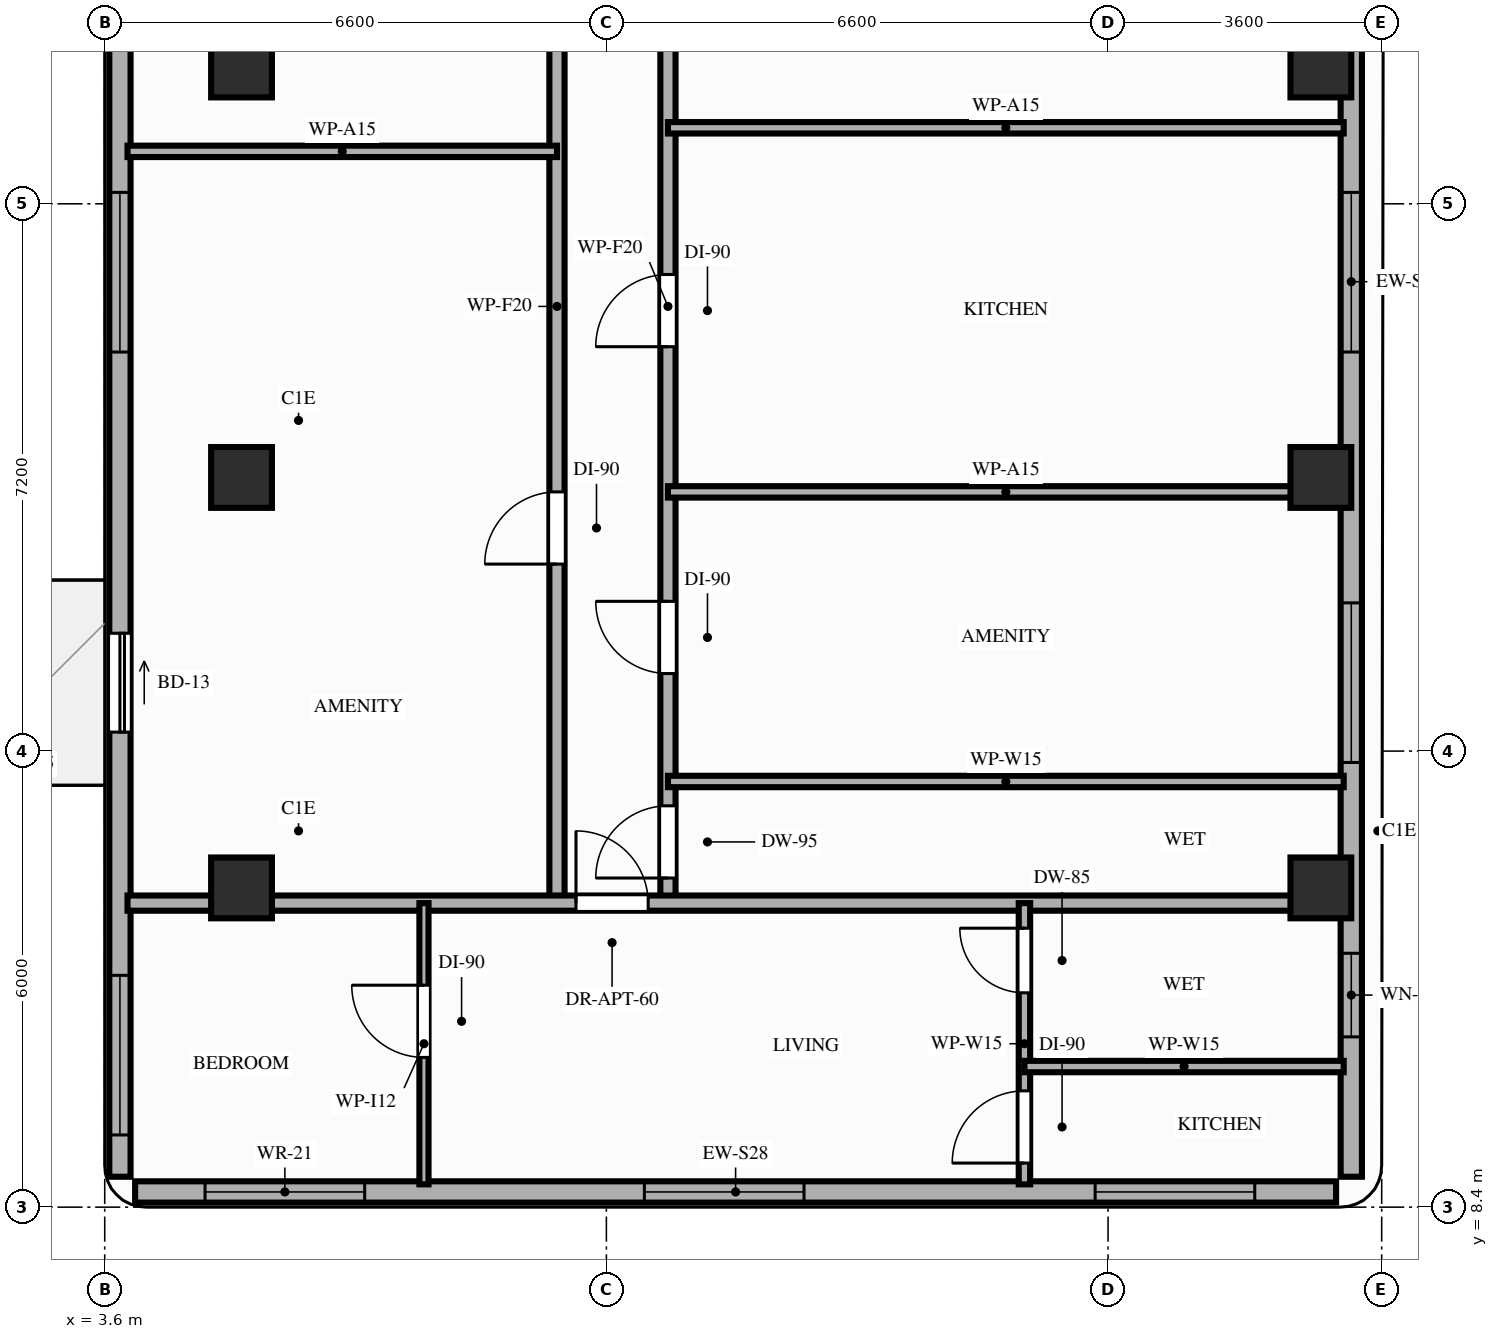
"""IFC4 building model, lengths in metres.
Left out: names, types, materials, properties, quantities, classifications, styles, units other than length and angle.
Written with IfcOpenShell. Run it as: python <this file> out.ifc"""

import sys

from ifc_helpers import new_model, si_unit, direction, frame, frame_2d, origin, origin_2d, place, context, subcontext, project, spatial, rectangle, extrude, element, fill, save


model = new_model("IFC4")
c1 = context("Model", 3, precision=1e-05, world=origin(), true_north=direction((0.0, 1.0)))
c2 = subcontext(c1, "Body", "Model", "MODEL_VIEW")
j1 = project(units=[si_unit("LENGTHUNIT", "METRE"), si_unit("PLANEANGLEUNIT", "RADIAN")], contexts=[c1])
p1 = place(None, origin())
s1 = spatial("IfcSite", under=j1, at=p1, CompositionType="ELEMENT")
p2 = place(p1, origin())
s2 = spatial("IfcBuilding", under=s1, at=p2, CompositionType="ELEMENT")
p3 = place(p2, frame((0.0, 0.0, 221.6)))
s3 = spatial("IfcBuildingStorey", under=s2, at=p3, CompositionType="ELEMENT", Elevation=221.6)
for number, where, z_axis, x_axis in (
    (1, (5.4, 12.6, 0.0), (0.0, 0.0, 1.0), (1.0, 0.0, 0.0)),
    (2, (19.6, 12.6, 0.0), (0.0, 0.0, 1.0), (1.0, 0.0, 0.0)),
    (3, (5.4, 18.0, 0.0), (0.0, 0.0, 1.0), (1.0, 0.0, 0.0)),
    (4, (19.6, 18.0, 0.0), (0.0, 0.0, 1.0), (1.0, 0.0, 0.0)),
    (5, (5.4, 23.4, 0.0), (0.0, 0.0, 1.0), (1.0, 0.0, 0.0)),
    (6, (19.6, 23.4, 0.0), (0.0, 0.0, 1.0), (1.0, 0.0, 0.0)),
):
    element("IfcColumn", number, at=place(p3, frame(where, z_axis=z_axis, x_axis=x_axis)), inside=s3, PredefinedType="COLUMN", context=c2, shape_type="SweptSolid", body=[
        extrude(rectangle(XDim=0.8, YDim=0.8, at=origin_2d()), origin(), (0.0, 0.0, 1.0), 3.2),
    ])
p4 = place(p3, frame((4.0, 8.6, 0.0), z_axis=(0.0, 0.0, 1.0), x_axis=(1.0, 0.0, 0.0)))
e7 = element("IfcWall", 7, at=p4, inside=s3, PredefinedType="STANDARD", context=c2, shape_type="SweptSolid", body=[
    extrude(rectangle(XDim=15.8, YDim=0.28, at=frame_2d((7.9, 0.0))), origin(), (0.0, 0.0, 1.0), 3.02),
])
p5 = place(p4, frame((0.92, 0.0, 0.85)))
e8 = element("IfcOpeningElement", 8, at=p5, cuts=e7, PredefinedType="OPENING", context=c2, shape_type="SweptSolid", body=[
    extrude(rectangle(XDim=2.1, YDim=1.8, at=frame_2d((1.05, 0.9))), frame((0.0, 0.15, 0.0), z_axis=(0.0, -1.0, 0.0), x_axis=(1.0, 0.0, 0.0)), (0.0, 0.0, 1.0), 0.3),
])
p6 = place(p4, frame((6.7, 0.0, 0.85)))
e9 = element("IfcOpeningElement", 9, at=p6, cuts=e7, PredefinedType="OPENING", context=c2, shape_type="SweptSolid", body=[
    extrude(rectangle(XDim=2.1, YDim=1.8, at=frame_2d((1.05, 0.9))), frame((0.0, 0.15, 0.0), z_axis=(0.0, -1.0, 0.0), x_axis=(1.0, 0.0, 0.0)), (0.0, 0.0, 1.0), 0.3),
])
p7 = place(p4, frame((12.63, 0.0, 0.85)))
e10 = element("IfcOpeningElement", 10, at=p7, cuts=e7, PredefinedType="OPENING", context=c2, shape_type="SweptSolid", body=[
    extrude(rectangle(XDim=2.1, YDim=1.8, at=frame_2d((1.05, 0.9))), frame((0.0, 0.15, 0.0), z_axis=(0.0, -1.0, 0.0), x_axis=(1.0, 0.0, 0.0)), (0.0, 0.0, 1.0), 0.3),
])
p8 = place(p3, frame((3.8, 42.1, 0.0), z_axis=(0.0, 0.0, 1.0), x_axis=(0.0, -1.0, 0.0)))
e11 = element("IfcWall", 11, at=p8, inside=s3, PredefinedType="STANDARD", context=c2, shape_type="SweptSolid", body=[
    extrude(rectangle(XDim=33.3, YDim=0.28, at=frame_2d((16.65, 0.0))), origin(), (0.0, 0.0, 1.0), 2.71),
])
p9 = place(p8, frame((26.15, 0.0, 0.0)))
e12 = element("IfcOpeningElement", 12, at=p9, cuts=e11, PredefinedType="OPENING", context=c2, shape_type="SweptSolid", body=[
    extrude(rectangle(XDim=1.3, YDim=2.08, at=frame_2d((0.65, 1.04))), frame((0.0, 0.15, 0.0), z_axis=(0.0, -1.0, 0.0), x_axis=(1.0, 0.0, 0.0)), (0.0, 0.0, 1.0), 0.3),
])
p10 = place(p8, frame((15.35, 0.0, 0.0)))
e13 = element("IfcOpeningElement", 13, at=p10, cuts=e11, PredefinedType="OPENING", context=c2, shape_type="SweptSolid", body=[
    extrude(rectangle(XDim=1.3, YDim=2.08, at=frame_2d((0.65, 1.04))), frame((0.0, 0.15, 0.0), z_axis=(0.0, -1.0, 0.0), x_axis=(1.0, 0.0, 0.0)), (0.0, 0.0, 1.0), 0.3),
])
p11 = place(p8, frame((30.65, 0.0, 0.85)))
e14 = element("IfcOpeningElement", 14, at=p11, cuts=e11, PredefinedType="OPENING", context=c2, shape_type="SweptSolid", body=[
    extrude(rectangle(XDim=2.1, YDim=1.61, at=frame_2d((1.05, 0.805))), frame((0.0, 0.15, 0.0), z_axis=(0.0, -1.0, 0.0), x_axis=(1.0, 0.0, 0.0)), (0.0, 0.0, 1.0), 0.3),
])
p12 = place(p8, frame((20.35, 0.0, 0.85)))
e15 = element("IfcOpeningElement", 15, at=p12, cuts=e11, PredefinedType="OPENING", context=c2, shape_type="SweptSolid", body=[
    extrude(rectangle(XDim=2.1, YDim=1.61, at=frame_2d((1.05, 0.805))), frame((0.0, 0.15, 0.0), z_axis=(0.0, -1.0, 0.0), x_axis=(1.0, 0.0, 0.0)), (0.0, 0.0, 1.0), 0.3),
])
p13 = place(p8, frame((9.75, 0.0, 0.85)))
e16 = element("IfcOpeningElement", 16, at=p13, cuts=e11, PredefinedType="OPENING", context=c2, shape_type="SweptSolid", body=[
    extrude(rectangle(XDim=2.1, YDim=1.61, at=frame_2d((1.05, 0.805))), frame((0.0, 0.15, 0.0), z_axis=(0.0, -1.0, 0.0), x_axis=(1.0, 0.0, 0.0)), (0.0, 0.0, 1.0), 0.3),
])
p14 = place(p8, frame((3.65, 0.0, 0.85)))
e17 = element("IfcOpeningElement", 17, at=p14, cuts=e11, PredefinedType="OPENING", context=c2, shape_type="SweptSolid", body=[
    extrude(rectangle(XDim=2.1, YDim=1.61, at=frame_2d((1.05, 0.805))), frame((0.0, 0.15, 0.0), z_axis=(0.0, -1.0, 0.0), x_axis=(1.0, 0.0, 0.0)), (0.0, 0.0, 1.0), 0.3),
])
p15 = place(p3, frame((20.0, 8.8, 0.0), z_axis=(0.0, 0.0, 1.0), x_axis=(0.0, 1.0, 0.0)))
e18 = element("IfcWall", 18, at=p15, inside=s3, PredefinedType="STANDARD", context=c2, shape_type="SweptSolid", body=[
    extrude(rectangle(XDim=23.55, YDim=0.28, at=frame_2d((11.775, 0.0))), origin(), (0.0, 0.0, 1.0), 2.51),
])
p16 = place(p15, frame((1.84, 0.0, 0.85)))
e19 = element("IfcOpeningElement", 19, at=p16, cuts=e18, PredefinedType="OPENING", context=c2, shape_type="SweptSolid", body=[
    extrude(rectangle(XDim=1.1, YDim=1.41, at=frame_2d((0.55, 0.705))), frame((0.0, 0.15, 0.0), z_axis=(0.0, -1.0, 0.0), x_axis=(1.0, 0.0, 0.0)), (0.0, 0.0, 1.0), 0.3),
])
p17 = place(p15, frame((5.45, 0.0, 0.85)))
e20 = element("IfcOpeningElement", 20, at=p17, cuts=e18, PredefinedType="OPENING", context=c2, shape_type="SweptSolid", body=[
    extrude(rectangle(XDim=2.1, YDim=1.41, at=frame_2d((1.05, 0.705))), frame((0.0, 0.15, 0.0), z_axis=(0.0, -1.0, 0.0), x_axis=(1.0, 0.0, 0.0)), (0.0, 0.0, 1.0), 0.3),
])
p18 = place(p15, frame((10.85, 0.0, 0.85)))
e21 = element("IfcOpeningElement", 21, at=p18, cuts=e18, PredefinedType="OPENING", context=c2, shape_type="SweptSolid", body=[
    extrude(rectangle(XDim=2.1, YDim=1.41, at=frame_2d((1.05, 0.705))), frame((0.0, 0.15, 0.0), z_axis=(0.0, -1.0, 0.0), x_axis=(1.0, 0.0, 0.0)), (0.0, 0.0, 1.0), 0.3),
])
p19 = place(p3, frame((9.55, 12.4, 0.0), z_axis=(0.0, 0.0, 1.0), x_axis=(0.0, 1.0, 0.0)))
e22 = element("IfcWall", 22, at=p19, inside=s3, PredefinedType="PARTITIONING", context=c2, shape_type="SweptSolid", body=[
    extrude(rectangle(XDim=15.7, YDim=0.2, at=frame_2d((7.85, 0.0))), origin(), (0.0, 0.0, 1.0), 2.51),
])
p20 = place(p19, frame((4.46, 0.0, 0.0)))
e23 = element("IfcOpeningElement", 23, at=p20, cuts=e22, PredefinedType="OPENING", context=c2, shape_type="SweptSolid", body=[
    extrude(rectangle(XDim=0.95, YDim=2.15, at=frame_2d((0.475, 1.075))), frame((0.0, 0.11, 0.0), z_axis=(0.0, -1.0, 0.0), x_axis=(1.0, 0.0, 0.0)), (0.0, 0.0, 1.0), 0.22),
])
p21 = place(p19, frame((12.31, 0.0, 0.0)))
e24 = element("IfcOpeningElement", 24, at=p21, cuts=e22, PredefinedType="OPENING", context=c2, shape_type="SweptSolid", body=[
    extrude(rectangle(XDim=0.95, YDim=2.15, at=frame_2d((0.475, 1.075))), frame((0.0, 0.11, 0.0), z_axis=(0.0, -1.0, 0.0), x_axis=(1.0, 0.0, 0.0)), (0.0, 0.0, 1.0), 0.22),
])
p22 = place(p3, frame((11.01, 12.4, 0.0), z_axis=(0.0, 0.0, 1.0), x_axis=(0.0, 1.0, 0.0)))
e25 = element("IfcWall", 25, at=p22, inside=s3, PredefinedType="PARTITIONING", context=c2, shape_type="SweptSolid", body=[
    extrude(rectangle(XDim=15.7, YDim=0.2, at=frame_2d((7.85, 0.0))), origin(), (0.0, 0.0, 1.0), 2.51),
])
p23 = place(p22, frame((0.33, 0.0, 0.0)))
e26 = element("IfcOpeningElement", 26, at=p23, cuts=e25, PredefinedType="OPENING", context=c2, shape_type="SweptSolid", body=[
    extrude(rectangle(XDim=0.95, YDim=2.1, at=frame_2d((0.475, 1.05))), frame((0.0, 0.11, 0.0), z_axis=(0.0, -1.0, 0.0), x_axis=(1.0, 0.0, 0.0)), (0.0, 0.0, 1.0), 0.22),
])
p24 = place(p22, frame((3.02, 0.0, 0.0)))
e27 = element("IfcOpeningElement", 27, at=p24, cuts=e25, PredefinedType="OPENING", context=c2, shape_type="SweptSolid", body=[
    extrude(rectangle(XDim=0.95, YDim=2.15, at=frame_2d((0.475, 1.075))), frame((0.0, 0.11, 0.0), z_axis=(0.0, -1.0, 0.0), x_axis=(1.0, 0.0, 0.0)), (0.0, 0.0, 1.0), 0.22),
])
p25 = place(p22, frame((7.32, 0.0, 0.0)))
e28 = element("IfcOpeningElement", 28, at=p25, cuts=e25, PredefinedType="OPENING", context=c2, shape_type="SweptSolid", body=[
    extrude(rectangle(XDim=0.95, YDim=2.15, at=frame_2d((0.475, 1.075))), frame((0.0, 0.11, 0.0), z_axis=(0.0, -1.0, 0.0), x_axis=(1.0, 0.0, 0.0)), (0.0, 0.0, 1.0), 0.22),
])
p26 = place(p22, frame((12.47, 0.0, 0.0)))
e29 = element("IfcOpeningElement", 29, at=p26, cuts=e25, PredefinedType="OPENING", context=c2, shape_type="SweptSolid", body=[
    extrude(rectangle(XDim=0.95, YDim=2.15, at=frame_2d((0.475, 1.075))), frame((0.0, 0.11, 0.0), z_axis=(0.0, -1.0, 0.0), x_axis=(1.0, 0.0, 0.0)), (0.0, 0.0, 1.0), 0.22),
])
p27 = place(p3, frame((3.9, 12.4, 0.0), z_axis=(0.0, 0.0, 1.0), x_axis=(1.0, 0.0, 0.0)))
e30 = element("IfcWall", 30, at=p27, inside=s3, PredefinedType="PARTITIONING", context=c2, shape_type="SweptSolid", body=[
    extrude(rectangle(XDim=16.0, YDim=0.2, at=frame_2d((8.0, 0.0))), origin(), (0.0, 0.0, 1.0), 2.51),
])
p28 = place(p27, frame((5.9, 0.0, 0.0)))
e31 = element("IfcOpeningElement", 31, at=p28, cuts=e30, PredefinedType="OPENING", context=c2, shape_type="SweptSolid", body=[
    extrude(rectangle(XDim=0.95, YDim=2.15, at=frame_2d((0.475, 1.075))), frame((0.0, 0.11, 0.0), z_axis=(0.0, -1.0, 0.0), x_axis=(1.0, 0.0, 0.0)), (0.0, 0.0, 1.0), 0.22),
])
p29 = place(p3, frame((7.8, 8.7, 0.0), z_axis=(0.0, 0.0, 1.0), x_axis=(0.0, 1.0, 0.0)))
e32 = element("IfcWall", 32, at=p29, inside=s3, PredefinedType="PARTITIONING", context=c2, shape_type="SweptSolid", body=[
    extrude(rectangle(XDim=3.7, YDim=0.12, at=frame_2d((1.85, 0.0))), origin(), (0.0, 0.0, 1.0), 2.51),
])
p30 = place(p29, frame((1.67, 0.0, 0.0)))
e33 = element("IfcOpeningElement", 33, at=p30, cuts=e32, PredefinedType="OPENING", context=c2, shape_type="SweptSolid", body=[
    extrude(rectangle(XDim=0.95, YDim=2.15, at=frame_2d((0.475, 1.075))), frame((0.0, 0.07, 0.0), z_axis=(0.0, -1.0, 0.0), x_axis=(1.0, 0.0, 0.0)), (0.0, 0.0, 1.0), 0.14),
])
p31 = place(p3, frame((15.7, 8.7, 0.0), z_axis=(0.0, 0.0, 1.0), x_axis=(0.0, 1.0, 0.0)))
e34 = element("IfcWall", 34, at=p31, inside=s3, PredefinedType="PARTITIONING", context=c2, shape_type="SweptSolid", body=[
    extrude(rectangle(XDim=3.7, YDim=0.15, at=frame_2d((1.85, 0.0))), origin(), (0.0, 0.0, 1.0), 2.51),
])
p32 = place(p31, frame((0.28, 0.0, 0.0)))
e35 = element("IfcOpeningElement", 35, at=p32, cuts=e34, PredefinedType="OPENING", context=c2, shape_type="SweptSolid", body=[
    extrude(rectangle(XDim=0.95, YDim=2.15, at=frame_2d((0.475, 1.075))), frame((0.0, 0.085, 0.0), z_axis=(0.0, -1.0, 0.0), x_axis=(1.0, 0.0, 0.0)), (0.0, 0.0, 1.0), 0.17),
])
p33 = place(p31, frame((2.52, 0.0, 0.0)))
e36 = element("IfcOpeningElement", 36, at=p33, cuts=e34, PredefinedType="OPENING", context=c2, shape_type="SweptSolid", body=[
    extrude(rectangle(XDim=0.85, YDim=2.1, at=frame_2d((0.425, 1.05))), frame((0.0, 0.085, 0.0), z_axis=(0.0, -1.0, 0.0), x_axis=(1.0, 0.0, 0.0)), (0.0, 0.0, 1.0), 0.17),
])
p34 = place(p3, frame((15.7, 10.25, 0.0), z_axis=(0.0, 0.0, 1.0), x_axis=(1.0, 0.0, 0.0)))
e37 = element("IfcWall", 37, at=p34, inside=s3, PredefinedType="PARTITIONING", context=c2, shape_type="SweptSolid", body=[
    extrude(rectangle(XDim=4.2, YDim=0.15, at=frame_2d((2.1, 0.0))), origin(), (0.0, 0.0, 1.0), 3.02),
])
p35 = place(p3, frame((3.9, 22.29, 0.0), z_axis=(0.0, 0.0, 1.0), x_axis=(1.0, 0.0, 0.0)))
e38 = element("IfcWall", 38, at=p35, inside=s3, PredefinedType="PARTITIONING", context=c2, shape_type="SweptSolid", body=[
    extrude(rectangle(XDim=5.65, YDim=0.15, at=frame_2d((2.825, 0.0))), origin(), (0.0, 0.0, 1.0), 2.51),
])
for number, where, z_axis, x_axis in (
    (39, (11.01, 14.0, 0.0), (0.0, 0.0, 1.0), (1.0, 0.0, 0.0)),
    (40, (11.01, 17.81, 0.0), (0.0, 0.0, 1.0), (1.0, 0.0, 0.0)),
    (41, (11.01, 22.6, 0.0), (0.0, 0.0, 1.0), (1.0, 0.0, 0.0)),
):
    element("IfcWall", number, at=place(p3, frame(where, z_axis=z_axis, x_axis=x_axis)), inside=s3, PredefinedType="PARTITIONING", context=c2, shape_type="SweptSolid", body=[
        extrude(rectangle(XDim=8.89, YDim=0.15, at=frame_2d((4.445, 0.0))), origin(), (0.0, 0.0, 1.0), 2.51),
    ])
p36 = place(p9, origin())
e42 = element("IfcDoor", 42, at=p36, inside=s3, OperationType="SLIDING_TO_LEFT", PredefinedType="DOOR", context=c2, shape_type="SweptSolid", body=[
    extrude(rectangle(XDim=1.3, YDim=2.08, at=frame_2d((0.65, 1.04))), frame((0.0, 0.025, 0.0), z_axis=(0.0, -1.0, 0.0), x_axis=(1.0, 0.0, 0.0)), (0.0, 0.0, 1.0), 0.05),
])
fill(e12, e42)
p37 = place(p5, origin())
e43 = element("IfcWindow", 43, at=p37, inside=s3, PartitioningType="SINGLE_PANEL", PredefinedType="WINDOW", context=c2, shape_type="SweptSolid", body=[
    extrude(rectangle(XDim=2.1, YDim=1.8, at=frame_2d((1.05, 0.9))), frame((0.0, 0.03, 0.0), z_axis=(0.0, -1.0, 0.0), x_axis=(1.0, 0.0, 0.0)), (0.0, 0.0, 1.0), 0.06),
])
fill(e8, e43)
p38 = place(p6, origin())
e44 = element("IfcWindow", 44, at=p38, inside=s3, PartitioningType="SINGLE_PANEL", PredefinedType="WINDOW", context=c2, shape_type="SweptSolid", body=[
    extrude(rectangle(XDim=2.1, YDim=1.8, at=frame_2d((1.05, 0.9))), frame((0.0, 0.03, 0.0), z_axis=(0.0, -1.0, 0.0), x_axis=(1.0, 0.0, 0.0)), (0.0, 0.0, 1.0), 0.06),
])
fill(e9, e44)
p39 = place(p7, origin())
e45 = element("IfcWindow", 45, at=p39, inside=s3, PartitioningType="SINGLE_PANEL", PredefinedType="WINDOW", context=c2, shape_type="SweptSolid", body=[
    extrude(rectangle(XDim=2.1, YDim=1.8, at=frame_2d((1.05, 0.9))), frame((0.0, 0.03, 0.0), z_axis=(0.0, -1.0, 0.0), x_axis=(1.0, 0.0, 0.0)), (0.0, 0.0, 1.0), 0.06),
])
fill(e10, e45)
p40 = place(p16, origin())
e46 = element("IfcWindow", 46, at=p40, inside=s3, PartitioningType="SINGLE_PANEL", PredefinedType="WINDOW", context=c2, shape_type="SweptSolid", body=[
    extrude(rectangle(XDim=1.1, YDim=1.41, at=frame_2d((0.55, 0.705))), frame((0.0, 0.03, 0.0), z_axis=(0.0, -1.0, 0.0), x_axis=(1.0, 0.0, 0.0)), (0.0, 0.0, 1.0), 0.06),
])
fill(e19, e46)
p41 = place(p11, origin())
e47 = element("IfcWindow", 47, at=p41, inside=s3, PartitioningType="SINGLE_PANEL", PredefinedType="WINDOW", context=c2, shape_type="SweptSolid", body=[
    extrude(rectangle(XDim=2.1, YDim=1.61, at=frame_2d((1.05, 0.805))), frame((0.0, 0.03, 0.0), z_axis=(0.0, -1.0, 0.0), x_axis=(1.0, 0.0, 0.0)), (0.0, 0.0, 1.0), 0.06),
])
fill(e14, e47)
p42 = place(p12, origin())
e48 = element("IfcWindow", 48, at=p42, inside=s3, PartitioningType="SINGLE_PANEL", PredefinedType="WINDOW", context=c2, shape_type="SweptSolid", body=[
    extrude(rectangle(XDim=2.1, YDim=1.61, at=frame_2d((1.05, 0.805))), frame((0.0, 0.03, 0.0), z_axis=(0.0, -1.0, 0.0), x_axis=(1.0, 0.0, 0.0)), (0.0, 0.0, 1.0), 0.06),
])
fill(e15, e48)
p43 = place(p17, origin())
e49 = element("IfcWindow", 49, at=p43, inside=s3, PartitioningType="SINGLE_PANEL", PredefinedType="WINDOW", context=c2, shape_type="SweptSolid", body=[
    extrude(rectangle(XDim=2.1, YDim=1.41, at=frame_2d((1.05, 0.705))), frame((0.0, 0.03, 0.0), z_axis=(0.0, -1.0, 0.0), x_axis=(1.0, 0.0, 0.0)), (0.0, 0.0, 1.0), 0.06),
])
fill(e20, e49)
p44 = place(p18, origin())
e50 = element("IfcWindow", 50, at=p44, inside=s3, PartitioningType="SINGLE_PANEL", PredefinedType="WINDOW", context=c2, shape_type="SweptSolid", body=[
    extrude(rectangle(XDim=2.1, YDim=1.41, at=frame_2d((1.05, 0.705))), frame((0.0, 0.03, 0.0), z_axis=(0.0, -1.0, 0.0), x_axis=(1.0, 0.0, 0.0)), (0.0, 0.0, 1.0), 0.06),
])
fill(e21, e50)
p45 = place(p28, origin())
e51 = element("IfcDoor", 51, at=p45, inside=s3, OperationType="SINGLE_SWING_LEFT", PredefinedType="DOOR", context=c2, shape_type="SweptSolid", body=[
    extrude(rectangle(XDim=0.95, YDim=2.15, at=frame_2d((0.475, 1.075))), frame((0.0, 0.025, 0.0), z_axis=(0.0, -1.0, 0.0), x_axis=(1.0, 0.0, 0.0)), (0.0, 0.0, 1.0), 0.05),
])
fill(e31, e51)
p46 = place(p30, origin())
e52 = element("IfcDoor", 52, at=p46, inside=s3, OperationType="SINGLE_SWING_RIGHT", PredefinedType="DOOR", context=c2, shape_type="SweptSolid", body=[
    extrude(rectangle(XDim=0.95, YDim=2.15, at=frame_2d((0.475, 1.075))), frame((0.0, 0.025, 0.0), z_axis=(0.0, -1.0, 0.0), x_axis=(1.0, 0.0, 0.0)), (0.0, 0.0, 1.0), 0.05),
])
fill(e33, e52)
p47 = place(p32, origin())
e53 = element("IfcDoor", 53, at=p47, inside=s3, OperationType="SINGLE_SWING_LEFT", PredefinedType="DOOR", context=c2, shape_type="SweptSolid", body=[
    extrude(rectangle(XDim=0.95, YDim=2.15, at=frame_2d((0.475, 1.075))), frame((0.0, 0.025, 0.0), z_axis=(0.0, -1.0, 0.0), x_axis=(1.0, 0.0, 0.0)), (0.0, 0.0, 1.0), 0.05),
])
fill(e35, e53)
p48 = place(p33, origin())
e54 = element("IfcDoor", 54, at=p48, inside=s3, OperationType="SINGLE_SWING_RIGHT", PredefinedType="DOOR", context=c2, shape_type="SweptSolid", body=[
    extrude(rectangle(XDim=0.85, YDim=2.1, at=frame_2d((0.425, 1.05))), frame((0.0, 0.025, 0.0), z_axis=(0.0, -1.0, 0.0), x_axis=(1.0, 0.0, 0.0)), (0.0, 0.0, 1.0), 0.05),
])
fill(e36, e54)
p49 = place(p20, origin())
e55 = element("IfcDoor", 55, at=p49, inside=s3, OperationType="SINGLE_SWING_LEFT", PredefinedType="DOOR", context=c2, shape_type="SweptSolid", body=[
    extrude(rectangle(XDim=0.95, YDim=2.15, at=frame_2d((0.475, 1.075))), frame((0.0, 0.025, 0.0), z_axis=(0.0, -1.0, 0.0), x_axis=(1.0, 0.0, 0.0)), (0.0, 0.0, 1.0), 0.05),
])
fill(e23, e55)
p50 = place(p23, origin())
e56 = element("IfcDoor", 56, at=p50, inside=s3, OperationType="SINGLE_SWING_LEFT", PredefinedType="DOOR", context=c2, shape_type="SweptSolid", body=[
    extrude(rectangle(XDim=0.95, YDim=2.1, at=frame_2d((0.475, 1.05))), frame((0.0, 0.025, 0.0), z_axis=(0.0, -1.0, 0.0), x_axis=(1.0, 0.0, 0.0)), (0.0, 0.0, 1.0), 0.05),
])
fill(e26, e56)
p51 = place(p24, origin())
e57 = element("IfcDoor", 57, at=p51, inside=s3, OperationType="SINGLE_SWING_RIGHT", PredefinedType="DOOR", context=c2, shape_type="SweptSolid", body=[
    extrude(rectangle(XDim=0.95, YDim=2.15, at=frame_2d((0.475, 1.075))), frame((0.0, 0.025, 0.0), z_axis=(0.0, -1.0, 0.0), x_axis=(1.0, 0.0, 0.0)), (0.0, 0.0, 1.0), 0.05),
])
fill(e27, e57)
p52 = place(p25, origin())
e58 = element("IfcDoor", 58, at=p52, inside=s3, OperationType="SINGLE_SWING_LEFT", PredefinedType="DOOR", context=c2, shape_type="SweptSolid", body=[
    extrude(rectangle(XDim=0.95, YDim=2.15, at=frame_2d((0.475, 1.075))), frame((0.0, 0.025, 0.0), z_axis=(0.0, -1.0, 0.0), x_axis=(1.0, 0.0, 0.0)), (0.0, 0.0, 1.0), 0.05),
])
fill(e28, e58)
save(model, sys.argv[1])
